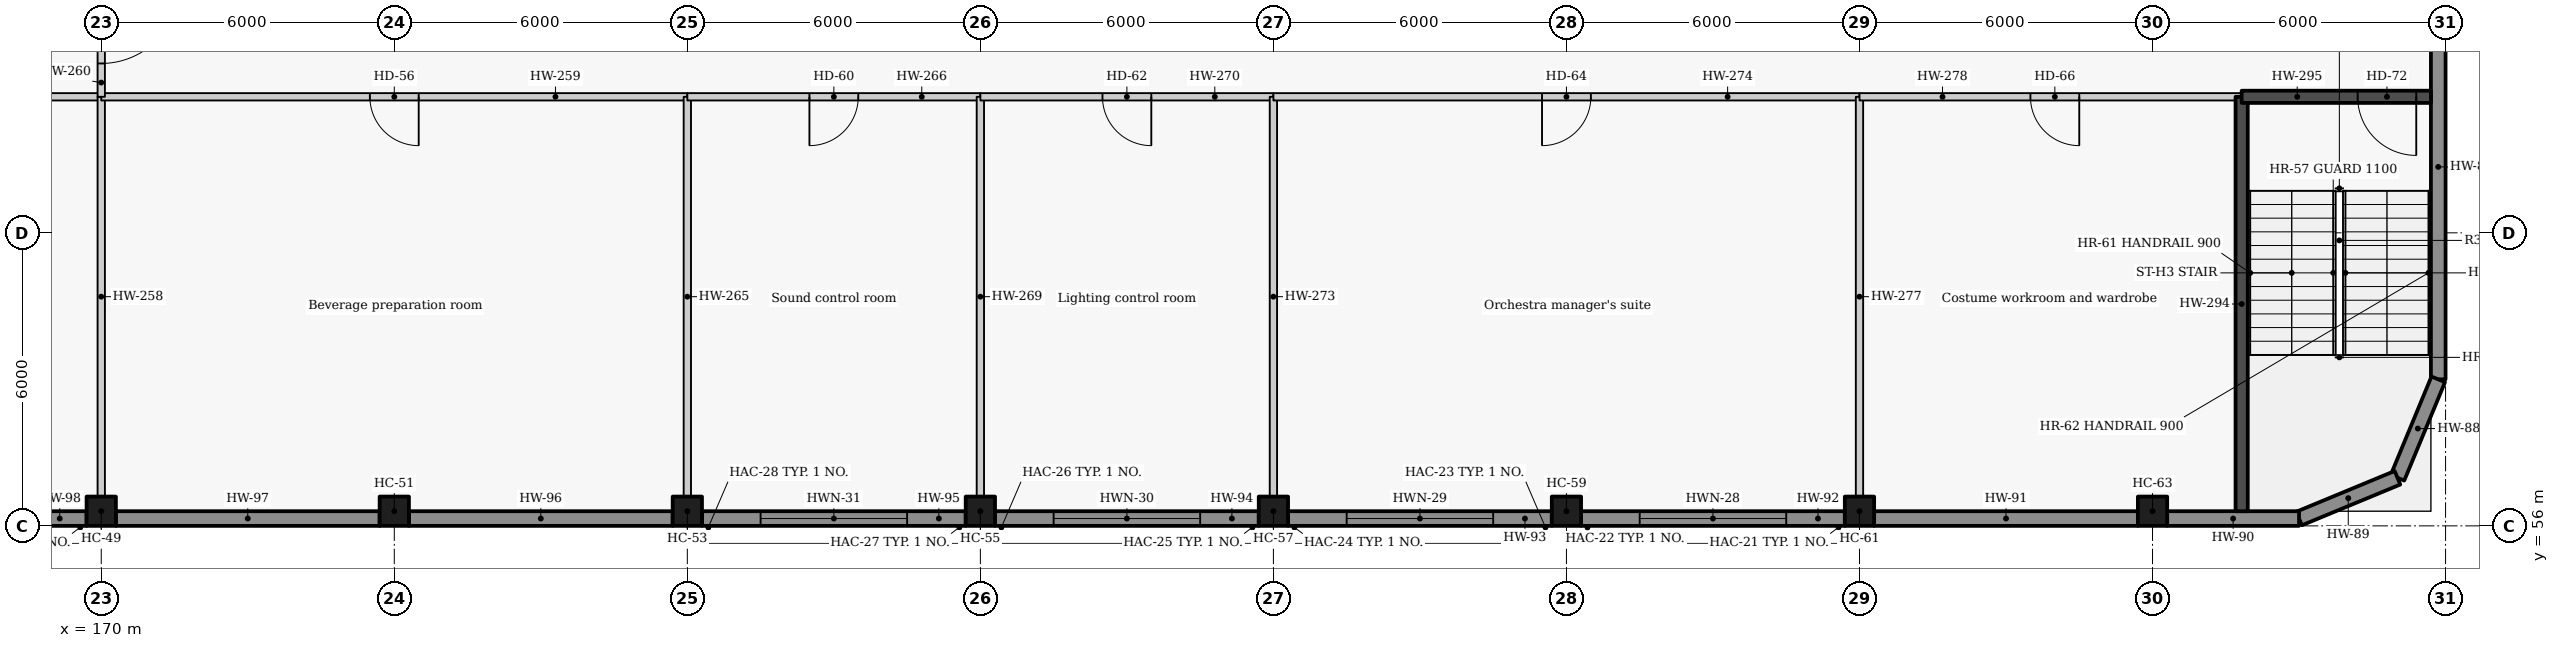
"""IFC4 building model, lengths in metres.
Left out: names, types, materials, properties, quantities, classifications, styles, units other than length and angle.
Written with IfcOpenShell. Run it as: python <this file> out.ifc"""

import sys

from ifc_helpers import new_model, si_unit, direction, frame, frame_2d, origin, origin_2d, place, context, subcontext, project, spatial, rectangle, extrude, element, fill, save


model = new_model("IFC4")
c1 = context("Model", 3, precision=1e-05, world=origin(), true_north=direction((0.0, 1.0)))
c2 = subcontext(c1, "Body", "Model", "MODEL_VIEW")
j1 = project(units=[si_unit("LENGTHUNIT", "METRE"), si_unit("PLANEANGLEUNIT", "RADIAN")], contexts=[c1])
p1 = place(None, origin())
s1 = spatial("IfcSite", under=j1, at=p1, CompositionType="ELEMENT")
p2 = place(p1, origin())
s2 = spatial("IfcBuilding", under=s1, at=p2, CompositionType="ELEMENT")
p3 = place(p2, frame((0.0, 0.0, 6.6)))
s3 = spatial("IfcBuildingStorey", under=s2, at=p3, CompositionType="ELEMENT", Elevation=6.6)
for number, where, z_axis, x_axis in (
    (1, (170.0, 56.3, 0.0), (0.0, 0.0, 1.0), (1.0, 0.0, 0.0)),
    (2, (176.0, 56.3, 0.0), (0.0, 0.0, 1.0), (1.0, 0.0, 0.0)),
    (3, (182.0, 56.3, 0.0), (0.0, 0.0, 1.0), (1.0, 0.0, 0.0)),
    (4, (188.0, 56.3, 0.0), (0.0, 0.0, 1.0), (1.0, 0.0, 0.0)),
    (5, (194.0, 56.3, 0.0), (0.0, 0.0, 1.0), (1.0, 0.0, 0.0)),
    (6, (200.0, 56.3, 0.0), (0.0, 0.0, 1.0), (1.0, 0.0, 0.0)),
    (7, (206.0, 56.3, 0.0), (0.0, 0.0, 1.0), (1.0, 0.0, 0.0)),
    (8, (212.0, 56.3, 0.0), (0.0, 0.0, 1.0), (1.0, 0.0, 0.0)),
):
    element("IfcColumn", number, at=place(p3, frame(where, z_axis=z_axis, x_axis=x_axis)), inside=s3, PredefinedType="COLUMN", context=c2, shape_type="SweptSolid", body=[
        extrude(rectangle(XDim=0.6, YDim=0.6, at=origin_2d()), origin(), (0.0, 0.0, 1.0), 4.8),
    ])
p4 = place(p3, frame((217.85, 67.7, 0.0), z_axis=(0.0, 0.0, 1.0), x_axis=(0.0, -1.0, 0.0)))
e9 = element("IfcWall", 9, at=p4, inside=s3, PredefinedType="SOLIDWALL", context=c2, shape_type="SweptSolid", body=[
    extrude(rectangle(XDim=8.7, YDim=0.3, at=frame_2d((4.35, 0.0))), origin(), (0.0, 0.0, 1.0), 4.8),
])
for number, where, z_axis, x_axis in (
    (10, (217.85, 59.0, 0.0), (0.0, 0.0, 1.0), (-0.383, -0.924, 0.0)),
    (11, (217.015, 56.985, 0.0), (0.0, 0.0, 1.0), (-0.924, -0.383, 0.0)),
):
    element("IfcWall", number, at=place(p3, frame(where, z_axis=z_axis, x_axis=x_axis)), inside=s3, PredefinedType="SOLIDWALL", context=c2, shape_type="SweptSolid", body=[
        extrude(rectangle(XDim=2.181, YDim=0.3, at=frame_2d((1.091, 0.0))), origin(), (0.0, 0.0, 1.0), 4.8),
    ])
p5 = place(p3, frame((215.0, 56.15, 0.0), z_axis=(0.0, 0.0, 1.0), x_axis=(-1.0, 0.0, 0.0)))
e12 = element("IfcWall", 12, at=p5, inside=s3, PredefinedType="SOLIDWALL", context=c2, shape_type="SweptSolid", body=[
    extrude(rectangle(XDim=2.7, YDim=0.3, at=frame_2d((1.35, 0.0))), origin(), (0.0, 0.0, 1.0), 4.8),
])
p6 = place(p3, frame((211.7, 56.15, 0.0), z_axis=(0.0, 0.0, 1.0), x_axis=(-1.0, 0.0, 0.0)))
e13 = element("IfcWall", 13, at=p6, inside=s3, PredefinedType="SOLIDWALL", context=c2, shape_type="SweptSolid", body=[
    extrude(rectangle(XDim=5.4, YDim=0.3, at=frame_2d((2.7, 0.0))), origin(), (0.0, 0.0, 1.0), 4.8),
])
p7 = place(p3, frame((205.7, 56.15, 0.0), z_axis=(0.0, 0.0, 1.0), x_axis=(-1.0, 0.0, 0.0)))
e14 = element("IfcWall", 14, at=p7, inside=s3, PredefinedType="SOLIDWALL", context=c2, shape_type="SweptSolid", body=[
    extrude(rectangle(XDim=5.4, YDim=0.3, at=frame_2d((2.7, 0.0))), origin(), (0.0, 0.0, 1.0), 4.8),
])
p8 = place(p7, frame((1.2, 0.0, 0.9)))
e15 = element("IfcOpeningElement", 15, at=p8, cuts=e14, PredefinedType="OPENING", context=c2, shape_type="SweptSolid", body=[
    extrude(rectangle(XDim=3.0, YDim=1.8, at=frame_2d((1.5, 0.9))), frame((0.0, 0.16, 0.0), z_axis=(0.0, -1.0, 0.0), x_axis=(1.0, 0.0, 0.0)), (0.0, 0.0, 1.0), 0.32),
])
p9 = place(p3, frame((199.7, 56.15, 0.0), z_axis=(0.0, 0.0, 1.0), x_axis=(-1.0, 0.0, 0.0)))
e16 = element("IfcWall", 16, at=p9, inside=s3, PredefinedType="SOLIDWALL", context=c2, shape_type="SweptSolid", body=[
    extrude(rectangle(XDim=5.4, YDim=0.3, at=frame_2d((2.7, 0.0))), origin(), (0.0, 0.0, 1.0), 4.8),
])
p10 = place(p9, frame((1.2, 0.0, 0.9)))
e17 = element("IfcOpeningElement", 17, at=p10, cuts=e16, PredefinedType="OPENING", context=c2, shape_type="SweptSolid", body=[
    extrude(rectangle(XDim=3.0, YDim=1.8, at=frame_2d((1.5, 0.9))), frame((0.0, 0.16, 0.0), z_axis=(0.0, -1.0, 0.0), x_axis=(1.0, 0.0, 0.0)), (0.0, 0.0, 1.0), 0.32),
])
p11 = place(p3, frame((193.7, 56.15, 0.0), z_axis=(0.0, 0.0, 1.0), x_axis=(-1.0, 0.0, 0.0)))
e18 = element("IfcWall", 18, at=p11, inside=s3, PredefinedType="SOLIDWALL", context=c2, shape_type="SweptSolid", body=[
    extrude(rectangle(XDim=5.4, YDim=0.3, at=frame_2d((2.7, 0.0))), origin(), (0.0, 0.0, 1.0), 4.8),
])
p12 = place(p11, frame((1.2, 0.0, 0.9)))
e19 = element("IfcOpeningElement", 19, at=p12, cuts=e18, PredefinedType="OPENING", context=c2, shape_type="SweptSolid", body=[
    extrude(rectangle(XDim=3.0, YDim=1.8, at=frame_2d((1.5, 0.9))), frame((0.0, 0.16, 0.0), z_axis=(0.0, -1.0, 0.0), x_axis=(1.0, 0.0, 0.0)), (0.0, 0.0, 1.0), 0.32),
])
p13 = place(p3, frame((187.7, 56.15, 0.0), z_axis=(0.0, 0.0, 1.0), x_axis=(-1.0, 0.0, 0.0)))
e20 = element("IfcWall", 20, at=p13, inside=s3, PredefinedType="SOLIDWALL", context=c2, shape_type="SweptSolid", body=[
    extrude(rectangle(XDim=5.4, YDim=0.3, at=frame_2d((2.7, 0.0))), origin(), (0.0, 0.0, 1.0), 4.8),
])
p14 = place(p13, frame((1.2, 0.0, 0.9)))
e21 = element("IfcOpeningElement", 21, at=p14, cuts=e20, PredefinedType="OPENING", context=c2, shape_type="SweptSolid", body=[
    extrude(rectangle(XDim=3.0, YDim=1.8, at=frame_2d((1.5, 0.9))), frame((0.0, 0.16, 0.0), z_axis=(0.0, -1.0, 0.0), x_axis=(1.0, 0.0, 0.0)), (0.0, 0.0, 1.0), 0.32),
])
for number, where, z_axis, x_axis in (
    (22, (181.7, 56.15, 0.0), (0.0, 0.0, 1.0), (-1.0, 0.0, 0.0)),
    (23, (175.7, 56.15, 0.0), (0.0, 0.0, 1.0), (-1.0, 0.0, 0.0)),
):
    element("IfcWall", number, at=place(p3, frame(where, z_axis=z_axis, x_axis=x_axis)), inside=s3, PredefinedType="SOLIDWALL", context=c2, shape_type="SweptSolid", body=[
        extrude(rectangle(XDim=5.4, YDim=0.3, at=frame_2d((2.7, 0.0))), origin(), (0.0, 0.0, 1.0), 4.8),
    ])
p15 = place(p3, frame((169.7, 56.15, 0.0), z_axis=(0.0, 0.0, 1.0), x_axis=(-1.0, 0.0, 0.0)))
e24 = element("IfcWall", 24, at=p15, inside=s3, PredefinedType="SOLIDWALL", context=c2, shape_type="SweptSolid", body=[
    extrude(rectangle(XDim=5.4, YDim=0.3, at=frame_2d((2.7, 0.0))), origin(), (0.0, 0.0, 1.0), 4.8),
])
p16 = place(p15, frame((1.2, 0.0, 0.9)))
e25 = element("IfcOpeningElement", 25, at=p16, cuts=e24, PredefinedType="OPENING", context=c2, shape_type="SweptSolid", body=[
    extrude(rectangle(XDim=3.0, YDim=1.8, at=frame_2d((1.5, 0.9))), frame((0.0, 0.16, 0.0), z_axis=(0.0, -1.0, 0.0), x_axis=(1.0, 0.0, 0.0)), (0.0, 0.0, 1.0), 0.32),
])
p17 = place(p3, frame((170.0, 64.785, 0.0), z_axis=(0.0, 0.0, 1.0), x_axis=(-1.0, 0.0, 0.0)))
e26 = element("IfcWall", 26, at=p17, inside=s3, PredefinedType="PARTITIONING", context=c2, shape_type="SweptSolid", body=[
    extrude(rectangle(XDim=13.825, YDim=0.15, at=frame_2d((6.913, 0.0))), origin(), (0.0, 0.0, 1.0), 4.45),
])
p18 = place(p17, frame((6.325, 0.0, 0.0)))
e27 = element("IfcOpeningElement", 27, at=p18, cuts=e26, PredefinedType="OPENING", context=c2, shape_type="SweptSolid", body=[
    extrude(rectangle(XDim=1.0, YDim=2.1, at=frame_2d((0.5, 1.05))), frame((0.0, 0.085, 0.0), z_axis=(0.0, -1.0, 0.0), x_axis=(1.0, 0.0, 0.0)), (0.0, 0.0, 1.0), 0.17),
])
p19 = place(p3, frame((170.0, 64.785, 0.0), z_axis=(0.0, 0.0, 1.0), x_axis=(0.0, -1.0, 0.0)))
e28 = element("IfcWall", 28, at=p19, inside=s3, PredefinedType="PARTITIONING", context=c2, shape_type="SweptSolid", body=[
    extrude(rectangle(XDim=8.185, YDim=0.15, at=frame_2d((4.092, 0.0))), origin(), (0.0, 0.0, 1.0), 4.45),
])
p20 = place(p3, frame((182.0, 64.785, 0.0), z_axis=(0.0, 0.0, 1.0), x_axis=(-1.0, 0.0, 0.0)))
e29 = element("IfcWall", 29, at=p20, inside=s3, PredefinedType="PARTITIONING", context=c2, shape_type="SweptSolid", body=[
    extrude(rectangle(XDim=12.0, YDim=0.15, at=frame_2d((6.0, 0.0))), origin(), (0.0, 0.0, 1.0), 4.45),
])
p21 = place(p20, frame((5.5, 0.0, 0.0)))
e30 = element("IfcOpeningElement", 30, at=p21, cuts=e29, PredefinedType="OPENING", context=c2, shape_type="SweptSolid", body=[
    extrude(rectangle(XDim=1.0, YDim=2.1, at=frame_2d((0.5, 1.05))), frame((0.0, 0.085, 0.0), z_axis=(0.0, -1.0, 0.0), x_axis=(1.0, 0.0, 0.0)), (0.0, 0.0, 1.0), 0.17),
])
p22 = place(p3, frame((170.0, 67.75, 0.0), z_axis=(0.0, 0.0, 1.0), x_axis=(0.0, -1.0, 0.0)))
e31 = element("IfcWall", 31, at=p22, inside=s3, PredefinedType="PARTITIONING", context=c2, shape_type="SweptSolid", body=[
    extrude(rectangle(XDim=2.965, YDim=0.15, at=frame_2d((1.482, 0.0))), origin(), (0.0, 0.0, 1.0), 4.45),
])
p23 = place(p22, frame((0.683, 0.0, 0.0)))
e32 = element("IfcOpeningElement", 32, at=p23, cuts=e31, PredefinedType="OPENING", context=c2, shape_type="SweptSolid", body=[
    extrude(rectangle(XDim=1.6, YDim=2.1, at=frame_2d((0.8, 1.05))), frame((0.0, 0.085, 0.0), z_axis=(0.0, -1.0, 0.0), x_axis=(1.0, 0.0, 0.0)), (0.0, 0.0, 1.0), 0.17),
])
p24 = place(p3, frame((182.0, 64.785, 0.0), z_axis=(0.0, 0.0, 1.0), x_axis=(0.0, -1.0, 0.0)))
e33 = element("IfcWall", 33, at=p24, inside=s3, PredefinedType="PARTITIONING", context=c2, shape_type="SweptSolid", body=[
    extrude(rectangle(XDim=8.185, YDim=0.15, at=frame_2d((4.092, 0.0))), origin(), (0.0, 0.0, 1.0), 4.45),
])
p25 = place(p3, frame((188.0, 64.785, 0.0), z_axis=(0.0, 0.0, 1.0), x_axis=(-1.0, 0.0, 0.0)))
e34 = element("IfcWall", 34, at=p25, inside=s3, PredefinedType="PARTITIONING", context=c2, shape_type="SweptSolid", body=[
    extrude(rectangle(XDim=6.0, YDim=0.15, at=frame_2d((3.0, 0.0))), origin(), (0.0, 0.0, 1.0), 4.45),
])
p26 = place(p25, frame((2.5, 0.0, 0.0)))
e35 = element("IfcOpeningElement", 35, at=p26, cuts=e34, PredefinedType="OPENING", context=c2, shape_type="SweptSolid", body=[
    extrude(rectangle(XDim=1.0, YDim=2.1, at=frame_2d((0.5, 1.05))), frame((0.0, 0.085, 0.0), z_axis=(0.0, -1.0, 0.0), x_axis=(1.0, 0.0, 0.0)), (0.0, 0.0, 1.0), 0.17),
])
p27 = place(p3, frame((188.0, 64.785, 0.0), z_axis=(0.0, 0.0, 1.0), x_axis=(0.0, -1.0, 0.0)))
e36 = element("IfcWall", 36, at=p27, inside=s3, PredefinedType="PARTITIONING", context=c2, shape_type="SweptSolid", body=[
    extrude(rectangle(XDim=8.185, YDim=0.15, at=frame_2d((4.092, 0.0))), origin(), (0.0, 0.0, 1.0), 4.45),
])
p28 = place(p3, frame((194.0, 64.785, 0.0), z_axis=(0.0, 0.0, 1.0), x_axis=(-1.0, 0.0, 0.0)))
e37 = element("IfcWall", 37, at=p28, inside=s3, PredefinedType="PARTITIONING", context=c2, shape_type="SweptSolid", body=[
    extrude(rectangle(XDim=6.0, YDim=0.15, at=frame_2d((3.0, 0.0))), origin(), (0.0, 0.0, 1.0), 4.45),
])
p29 = place(p28, frame((2.5, 0.0, 0.0)))
e38 = element("IfcOpeningElement", 38, at=p29, cuts=e37, PredefinedType="OPENING", context=c2, shape_type="SweptSolid", body=[
    extrude(rectangle(XDim=1.0, YDim=2.1, at=frame_2d((0.5, 1.05))), frame((0.0, 0.085, 0.0), z_axis=(0.0, -1.0, 0.0), x_axis=(1.0, 0.0, 0.0)), (0.0, 0.0, 1.0), 0.17),
])
p30 = place(p3, frame((194.0, 64.785, 0.0), z_axis=(0.0, 0.0, 1.0), x_axis=(0.0, -1.0, 0.0)))
e39 = element("IfcWall", 39, at=p30, inside=s3, PredefinedType="PARTITIONING", context=c2, shape_type="SweptSolid", body=[
    extrude(rectangle(XDim=8.185, YDim=0.15, at=frame_2d((4.092, 0.0))), origin(), (0.0, 0.0, 1.0), 4.45),
])
p31 = place(p3, frame((206.0, 64.785, 0.0), z_axis=(0.0, 0.0, 1.0), x_axis=(-1.0, 0.0, 0.0)))
e40 = element("IfcWall", 40, at=p31, inside=s3, PredefinedType="PARTITIONING", context=c2, shape_type="SweptSolid", body=[
    extrude(rectangle(XDim=12.0, YDim=0.15, at=frame_2d((6.0, 0.0))), origin(), (0.0, 0.0, 1.0), 4.45),
])
p32 = place(p31, frame((5.5, 0.0, 0.0)))
e41 = element("IfcOpeningElement", 41, at=p32, cuts=e40, PredefinedType="OPENING", context=c2, shape_type="SweptSolid", body=[
    extrude(rectangle(XDim=1.0, YDim=2.1, at=frame_2d((0.5, 1.05))), frame((0.0, 0.085, 0.0), z_axis=(0.0, -1.0, 0.0), x_axis=(1.0, 0.0, 0.0)), (0.0, 0.0, 1.0), 0.17),
])
p33 = place(p3, frame((206.0, 64.785, 0.0), z_axis=(0.0, 0.0, 1.0), x_axis=(0.0, -1.0, 0.0)))
e42 = element("IfcWall", 42, at=p33, inside=s3, PredefinedType="PARTITIONING", context=c2, shape_type="SweptSolid", body=[
    extrude(rectangle(XDim=8.185, YDim=0.15, at=frame_2d((4.092, 0.0))), origin(), (0.0, 0.0, 1.0), 4.45),
])
p34 = place(p3, frame((213.825, 64.785, 0.0), z_axis=(0.0, 0.0, 1.0), x_axis=(-1.0, 0.0, 0.0)))
e43 = element("IfcWall", 43, at=p34, inside=s3, PredefinedType="PARTITIONING", context=c2, shape_type="SweptSolid", body=[
    extrude(rectangle(XDim=7.825, YDim=0.15, at=frame_2d((3.913, 0.0))), origin(), (0.0, 0.0, 1.0), 4.45),
])
p35 = place(p34, frame((3.325, 0.0, 0.0)))
e44 = element("IfcOpeningElement", 44, at=p35, cuts=e43, PredefinedType="OPENING", context=c2, shape_type="SweptSolid", body=[
    extrude(rectangle(XDim=1.0, YDim=2.1, at=frame_2d((0.5, 1.05))), frame((0.0, 0.085, 0.0), z_axis=(0.0, -1.0, 0.0), x_axis=(1.0, 0.0, 0.0)), (0.0, 0.0, 1.0), 0.17),
])
p36 = place(p3, frame((213.825, 56.3, 0.0), z_axis=(0.0, 0.0, 1.0), x_axis=(0.0, 1.0, 0.0)))
e45 = element("IfcWall", 45, at=p36, inside=s3, PredefinedType="SOLIDWALL", context=c2, shape_type="SweptSolid", body=[
    extrude(rectangle(XDim=8.485, YDim=0.25, at=frame_2d((4.242, 0.0))), origin(), (0.0, 0.0, 1.0), 4.8),
])
p37 = place(p3, frame((217.7, 64.785, 0.0), z_axis=(0.0, 0.0, 1.0), x_axis=(-1.0, 0.0, 0.0)))
e46 = element("IfcWall", 46, at=p37, inside=s3, PredefinedType="SOLIDWALL", context=c2, shape_type="SweptSolid", body=[
    extrude(rectangle(XDim=3.875, YDim=0.25, at=frame_2d((1.938, 0.0))), origin(), (0.0, 0.0, 1.0), 4.8),
])
p38 = place(p37, frame((0.3, 0.0, 0.0)))
e47 = element("IfcOpeningElement", 47, at=p38, cuts=e46, PredefinedType="OPENING", context=c2, shape_type="SweptSolid", body=[
    extrude(rectangle(XDim=1.2, YDim=2.1, at=frame_2d((0.6, 1.05))), frame((0.0, 0.135, 0.0), z_axis=(0.0, -1.0, 0.0), x_axis=(1.0, 0.0, 0.0)), (0.0, 0.0, 1.0), 0.27),
])
p39 = place(p8, origin())
e48 = element("IfcWindow", 48, at=p39, inside=s3, PartitioningType="SINGLE_PANEL", PredefinedType="WINDOW", context=c2, shape_type="SweptSolid", body=[
    extrude(rectangle(XDim=3.0, YDim=1.8, at=frame_2d((1.5, 0.9))), frame((0.0, 0.03, 0.0), z_axis=(0.0, -1.0, 0.0), x_axis=(1.0, 0.0, 0.0)), (0.0, 0.0, 1.0), 0.06),
])
fill(e15, e48)
p40 = place(p10, origin())
e49 = element("IfcWindow", 49, at=p40, inside=s3, PartitioningType="SINGLE_PANEL", PredefinedType="WINDOW", context=c2, shape_type="SweptSolid", body=[
    extrude(rectangle(XDim=3.0, YDim=1.8, at=frame_2d((1.5, 0.9))), frame((0.0, 0.03, 0.0), z_axis=(0.0, -1.0, 0.0), x_axis=(1.0, 0.0, 0.0)), (0.0, 0.0, 1.0), 0.06),
])
fill(e17, e49)
p41 = place(p12, origin())
e50 = element("IfcWindow", 50, at=p41, inside=s3, PartitioningType="SINGLE_PANEL", PredefinedType="WINDOW", context=c2, shape_type="SweptSolid", body=[
    extrude(rectangle(XDim=3.0, YDim=1.8, at=frame_2d((1.5, 0.9))), frame((0.0, 0.03, 0.0), z_axis=(0.0, -1.0, 0.0), x_axis=(1.0, 0.0, 0.0)), (0.0, 0.0, 1.0), 0.06),
])
fill(e19, e50)
p42 = place(p14, origin())
e51 = element("IfcWindow", 51, at=p42, inside=s3, PartitioningType="SINGLE_PANEL", PredefinedType="WINDOW", context=c2, shape_type="SweptSolid", body=[
    extrude(rectangle(XDim=3.0, YDim=1.8, at=frame_2d((1.5, 0.9))), frame((0.0, 0.03, 0.0), z_axis=(0.0, -1.0, 0.0), x_axis=(1.0, 0.0, 0.0)), (0.0, 0.0, 1.0), 0.06),
])
fill(e21, e51)
p43 = place(p21, origin())
e52 = element("IfcDoor", 52, at=p43, inside=s3, OperationType="SINGLE_SWING_LEFT", PredefinedType="DOOR", context=c2, shape_type="SweptSolid", body=[
    extrude(rectangle(XDim=1.0, YDim=2.1, at=frame_2d((0.5, 1.05))), frame((0.0, 0.025, 0.0), z_axis=(0.0, -1.0, 0.0), x_axis=(1.0, 0.0, 0.0)), (0.0, 0.0, 1.0), 0.05),
])
fill(e30, e52)
p44 = place(p23, origin())
e53 = element("IfcDoor", 53, at=p44, inside=s3, OperationType="DOUBLE_DOOR_SINGLE_SWING", PredefinedType="DOOR", context=c2, shape_type="SweptSolid", body=[
    extrude(rectangle(XDim=1.6, YDim=2.1, at=frame_2d((0.8, 1.05))), frame((0.0, 0.025, 0.0), z_axis=(0.0, -1.0, 0.0), x_axis=(1.0, 0.0, 0.0)), (0.0, 0.0, 1.0), 0.05),
])
fill(e32, e53)
p45 = place(p26, origin())
e54 = element("IfcDoor", 54, at=p45, inside=s3, OperationType="SINGLE_SWING_RIGHT", PredefinedType="DOOR", context=c2, shape_type="SweptSolid", body=[
    extrude(rectangle(XDim=1.0, YDim=2.1, at=frame_2d((0.5, 1.05))), frame((0.0, 0.025, 0.0), z_axis=(0.0, -1.0, 0.0), x_axis=(1.0, 0.0, 0.0)), (0.0, 0.0, 1.0), 0.05),
])
fill(e35, e54)
p46 = place(p29, origin())
e55 = element("IfcDoor", 55, at=p46, inside=s3, OperationType="SINGLE_SWING_LEFT", PredefinedType="DOOR", context=c2, shape_type="SweptSolid", body=[
    extrude(rectangle(XDim=1.0, YDim=2.1, at=frame_2d((0.5, 1.05))), frame((0.0, 0.025, 0.0), z_axis=(0.0, -1.0, 0.0), x_axis=(1.0, 0.0, 0.0)), (0.0, 0.0, 1.0), 0.05),
])
fill(e38, e55)
p47 = place(p32, origin())
e56 = element("IfcDoor", 56, at=p47, inside=s3, OperationType="SINGLE_SWING_RIGHT", PredefinedType="DOOR", context=c2, shape_type="SweptSolid", body=[
    extrude(rectangle(XDim=1.0, YDim=2.1, at=frame_2d((0.5, 1.05))), frame((0.0, 0.025, 0.0), z_axis=(0.0, -1.0, 0.0), x_axis=(1.0, 0.0, 0.0)), (0.0, 0.0, 1.0), 0.05),
])
fill(e41, e56)
p48 = place(p35, origin())
e57 = element("IfcDoor", 57, at=p48, inside=s3, OperationType="SINGLE_SWING_LEFT", PredefinedType="DOOR", context=c2, shape_type="SweptSolid", body=[
    extrude(rectangle(XDim=1.0, YDim=2.1, at=frame_2d((0.5, 1.05))), frame((0.0, 0.025, 0.0), z_axis=(0.0, -1.0, 0.0), x_axis=(1.0, 0.0, 0.0)), (0.0, 0.0, 1.0), 0.05),
])
fill(e44, e57)
p49 = place(p38, origin())
e58 = element("IfcDoor", 58, at=p49, inside=s3, OperationType="SINGLE_SWING_LEFT", PredefinedType="DOOR", context=c2, shape_type="SweptSolid", body=[
    extrude(rectangle(XDim=1.2, YDim=2.1, at=frame_2d((0.6, 1.05))), frame((0.0, 0.025, 0.0), z_axis=(0.0, -1.0, 0.0), x_axis=(1.0, 0.0, 0.0)), (0.0, 0.0, 1.0), 0.05),
])
fill(e47, e58)
save(model, sys.argv[1])
